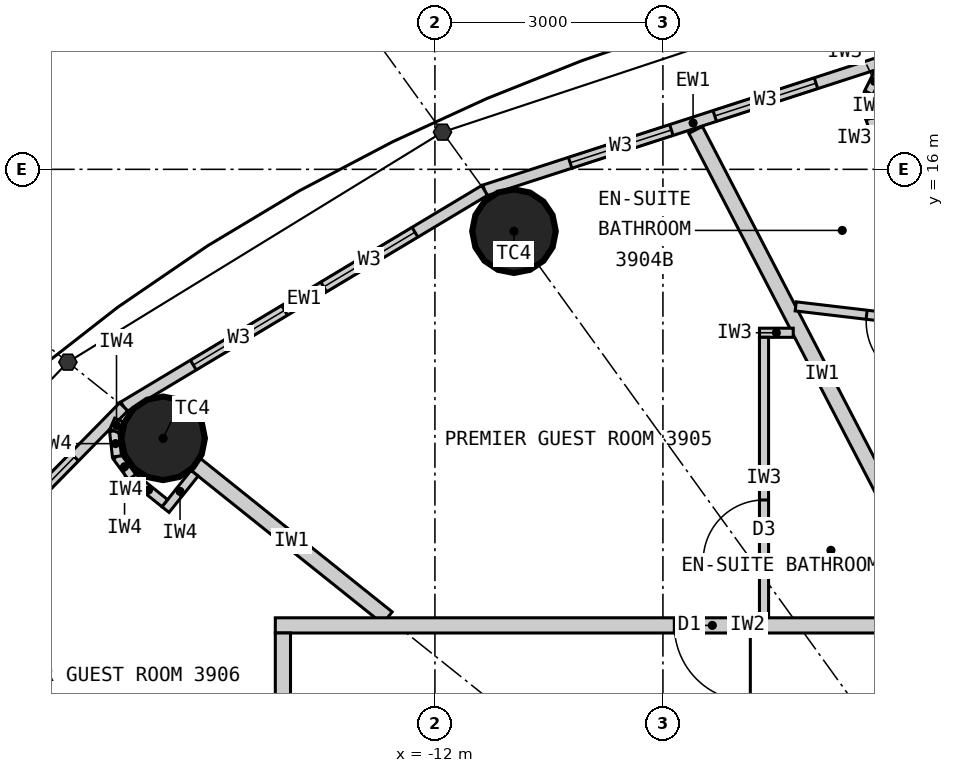
"""IFC4 building model, lengths in metres.
Left out: names, types, materials, properties, quantities, classifications, styles, units other than length and angle.
Written with IfcOpenShell. Run it as: python <this file> out.ifc"""

import sys

from ifc_helpers import new_model, si_unit, direction, frame, frame_2d, origin, origin_2d, place, context, subcontext, project, spatial, rectangle, circle, extrude, element, fill, save


model = new_model("IFC4")
c1 = context("Model", 3, precision=1e-05, world=origin(), true_north=direction((0.0, 1.0)))
c2 = subcontext(c1, "Body", "Model", "MODEL_VIEW")
j1 = project(units=[si_unit("LENGTHUNIT", "METRE"), si_unit("PLANEANGLEUNIT", "RADIAN")], contexts=[c1])
p1 = place(None, origin())
s1 = spatial("IfcSite", under=j1, at=p1, CompositionType="ELEMENT")
p2 = place(p1, origin())
s2 = spatial("IfcBuilding", under=s1, at=p2, CompositionType="ELEMENT")
p3 = place(p2, frame((0.0, 0.0, 150.0)))
s3 = spatial("IfcBuildingStorey", under=s2, at=p3, CompositionType="ELEMENT", Elevation=150.0)
for number, where, z_axis, x_axis in (
    (1, (-10.96, 15.186, 0.0), (0.0, 0.0, 1.0), (1.0, 0.0, 0.0)),
    (2, (-15.576, 12.461, 0.0), (0.0, 0.0, 1.0), (1.0, 0.0, 0.0)),
):
    element("IfcColumn", number, at=place(p3, frame(where, z_axis=z_axis, x_axis=x_axis)), inside=s3, PredefinedType="COLUMN", context=c2, shape_type="SweptSolid", body=[
        extrude(circle(Radius=0.55, at=origin_2d()), origin(), (0.0, 0.0, 1.0), 3.3),
    ])
p4 = place(p3, frame((-5.86, 17.497, 0.0), z_axis=(0.0, 0.0, 1.0), x_axis=(-0.951432482129, -0.307857486429, 0.0)))
e3 = element("IfcWall", 3, at=p4, inside=s3, PredefinedType="ELEMENTEDWALL", context=c2, shape_type="SweptSolid", body=[
    extrude(rectangle(XDim=5.766, YDim=0.15, at=frame_2d((2.883, 0.0))), origin(), (0.0, 0.0, 1.0), 3.12),
])
p5 = place(p4, frame((1.183, 0.0, 0.9)))
e4 = element("IfcOpeningElement", 4, at=p5, cuts=e3, PredefinedType="OPENING", context=c2, shape_type="SweptSolid", body=[
    extrude(rectangle(XDim=1.4, YDim=1.9, at=frame_2d((0.7, 0.95))), frame((0.0, 0.085, 0.0), z_axis=(0.0, -1.0, 0.0), x_axis=(1.0, 0.0, 0.0)), (0.0, 0.0, 1.0), 0.17),
])
p6 = place(p4, frame((3.183, 0.0, 0.9)))
e5 = element("IfcOpeningElement", 5, at=p6, cuts=e3, PredefinedType="OPENING", context=c2, shape_type="SweptSolid", body=[
    extrude(rectangle(XDim=1.4, YDim=1.9, at=frame_2d((0.7, 0.95))), frame((0.0, 0.085, 0.0), z_axis=(0.0, -1.0, 0.0), x_axis=(1.0, 0.0, 0.0)), (0.0, 0.0, 1.0), 0.17),
])
p7 = place(p3, frame((-11.346, 15.722, 0.0), z_axis=(0.0, 0.0, 1.0), x_axis=(-0.857695199231, -0.514158482587, 0.0)))
e6 = element("IfcWall", 6, at=p7, inside=s3, PredefinedType="ELEMENTEDWALL", context=c2, shape_type="SweptSolid", body=[
    extrude(rectangle(XDim=5.536, YDim=0.15, at=frame_2d((2.768, 0.0))), origin(), (0.0, 0.0, 1.0), 3.12),
])
p8 = place(p7, frame((1.068, 0.0, 0.9)))
e7 = element("IfcOpeningElement", 7, at=p8, cuts=e6, PredefinedType="OPENING", context=c2, shape_type="SweptSolid", body=[
    extrude(rectangle(XDim=1.4, YDim=1.9, at=frame_2d((0.7, 0.95))), frame((0.0, 0.085, 0.0), z_axis=(0.0, -1.0, 0.0), x_axis=(1.0, 0.0, 0.0)), (0.0, 0.0, 1.0), 0.17),
])
p9 = place(p7, frame((3.068, 0.0, 0.9)))
e8 = element("IfcOpeningElement", 8, at=p9, cuts=e6, PredefinedType="OPENING", context=c2, shape_type="SweptSolid", body=[
    extrude(rectangle(XDim=1.4, YDim=1.9, at=frame_2d((0.7, 0.95))), frame((0.0, 0.085, 0.0), z_axis=(0.0, -1.0, 0.0), x_axis=(1.0, 0.0, 0.0)), (0.0, 0.0, 1.0), 0.17),
])
p10 = place(p3, frame((-16.095, 12.876, 0.0), z_axis=(0.0, 0.0, 1.0), x_axis=(-0.700727467776, -0.71342905457, 0.0)))
e9 = element("IfcWall", 9, at=p10, inside=s3, PredefinedType="ELEMENTEDWALL", context=c2, shape_type="SweptSolid", body=[
    extrude(rectangle(XDim=5.247, YDim=0.15, at=frame_2d((2.624, 0.0))), origin(), (0.0, 0.0, 1.0), 3.12),
])
p11 = place(p10, frame((0.924, 0.0, 0.9)))
e10 = element("IfcOpeningElement", 10, at=p11, cuts=e9, PredefinedType="OPENING", context=c2, shape_type="SweptSolid", body=[
    extrude(rectangle(XDim=1.4, YDim=1.9, at=frame_2d((0.7, 0.95))), frame((0.0, 0.085, 0.0), z_axis=(0.0, -1.0, 0.0), x_axis=(1.0, 0.0, 0.0)), (0.0, 0.0, 1.0), 0.17),
])
p12 = place(p10, frame((2.924, 0.0, 0.9)))
e11 = element("IfcOpeningElement", 11, at=p12, cuts=e9, PredefinedType="OPENING", context=c2, shape_type="SweptSolid", body=[
    extrude(rectangle(XDim=1.4, YDim=1.9, at=frame_2d((0.7, 0.95))), frame((0.0, 0.085, 0.0), z_axis=(0.0, -1.0, 0.0), x_axis=(1.0, 0.0, 0.0)), (0.0, 0.0, 1.0), 0.17),
])
p13 = place(p3, frame((-5.24, 10.1, 0.0), z_axis=(0.0, 0.0, 1.0), x_axis=(-0.460532965373, 0.887642601391, 0.0)))
e12 = element("IfcWall", 12, at=p13, inside=s3, PredefinedType="PARTITIONING", context=c2, shape_type="SweptSolid", body=[
    extrude(rectangle(XDim=7.231, YDim=0.2, at=frame_2d((3.616, 0.0))), origin(), (0.0, 0.0, 1.0), 3.12),
])
p14 = place(p3, frame((-12.625, 10.1, 0.0), z_axis=(0.0, 0.0, 1.0), x_axis=(-0.780876185034, 0.624685827954, 0.0)))
e13 = element("IfcWall", 13, at=p14, inside=s3, PredefinedType="PARTITIONING", context=c2, shape_type="SweptSolid", body=[
    extrude(rectangle(XDim=3.229, YDim=0.2, at=frame_2d((1.615, 0.0))), origin(), (0.0, 0.0, 1.0), 2.42),
])
p15 = place(p3, frame((-7.253, 14.197, 0.0), z_axis=(0.0, 0.0, 1.0), x_axis=(0.993128188393, -0.117031625725, 0.0)))
e14 = element("IfcWall", 14, at=p15, inside=s3, PredefinedType="PARTITIONING", context=c2, shape_type="SweptSolid", body=[
    extrude(rectangle(XDim=2.678, YDim=0.12, at=frame_2d((1.339, 0.0))), origin(), (0.0, 0.0, 1.0), 3.12),
])
p16 = place(p15, frame((0.939, 0.0, 0.0)))
e15 = element("IfcOpeningElement", 15, at=p16, cuts=e14, PredefinedType="OPENING", context=c2, shape_type="SweptSolid", body=[
    extrude(rectangle(XDim=0.8, YDim=2.1, at=frame_2d((0.4, 1.05))), frame((0.0, 0.07, 0.0), z_axis=(0.0, -1.0, 0.0), x_axis=(1.0, 0.0, 0.0)), (0.0, 0.0, 1.0), 0.14),
])
p17 = place(p3, frame((-6.097, 16.149, 0.0), z_axis=(0.0, 0.0, 1.0), x_axis=(-0.317292604854, 0.948327687514, 0.0)))
e16 = element("IfcWall", 16, at=p17, inside=s3, PredefinedType="PARTITIONING", context=c2, shape_type="SweptSolid", body=[
    extrude(rectangle(XDim=0.55, YDim=0.12, at=frame_2d((0.275, 0.0))), origin(), (0.0, 0.0, 1.0), 3.12),
])
for number, where, z_axis, x_axis in (
    (17, (-6.271, 16.67, 0.0), (0.0, 0.0, 1.0), (-0.061, 0.998, 0.0)),
    (18, (-6.292, 17.007, 0.0), (0.0, 0.0, 1.0), (0.445, 0.895, 0.0)),
):
    element("IfcWall", number, at=place(p3, frame(where, z_axis=z_axis, x_axis=x_axis)), inside=s3, PredefinedType="PARTITIONING", context=c2, shape_type="SweptSolid", body=[
        extrude(rectangle(XDim=0.338, YDim=0.12, at=frame_2d((0.169, 0.0))), origin(), (0.0, 0.0, 1.0), 3.12),
    ])
p18 = place(p3, frame((-7.286, 13.85, 0.0), z_axis=(0.0, 0.0, 1.0), x_axis=(-1.0, 0.0, 0.0)))
e19 = element("IfcWall", 19, at=p18, inside=s3, PredefinedType="PARTITIONING", context=c2, shape_type="SweptSolid", body=[
    extrude(rectangle(XDim=0.444, YDim=0.12, at=frame_2d((0.222, 0.0))), origin(), (0.0, 0.0, 1.0), 3.12),
])
p19 = place(p3, frame((-7.67, 10.1, 0.0), z_axis=(0.0, 0.0, 1.0), x_axis=(0.0, 1.0, 0.0)))
e20 = element("IfcWall", 20, at=p19, inside=s3, PredefinedType="PARTITIONING", context=c2, shape_type="SweptSolid", body=[
    extrude(rectangle(XDim=3.69, YDim=0.12, at=frame_2d((1.845, 0.0))), origin(), (0.0, 0.0, 1.0), 3.12),
])
p20 = place(p19, frame((0.75, 0.0, 0.0)))
e21 = element("IfcOpeningElement", 21, at=p20, cuts=e20, PredefinedType="OPENING", context=c2, shape_type="SweptSolid", body=[
    extrude(rectangle(XDim=0.8, YDim=2.1, at=frame_2d((0.4, 1.05))), frame((0.0, 0.07, 0.0), z_axis=(0.0, -1.0, 0.0), x_axis=(1.0, 0.0, 0.0)), (0.0, 0.0, 1.0), 0.14),
])
p21 = place(p3, frame((-14.1, 10.0, 0.0), z_axis=(0.0, 0.0, 1.0), x_axis=(1.0, 0.0, 0.0)))
e22 = element("IfcWall", 22, at=p21, inside=s3, PredefinedType="PARTITIONING", context=c2, shape_type="SweptSolid", body=[
    extrude(rectangle(XDim=12.43, YDim=0.2, at=frame_2d((6.215, 0.0))), origin(), (0.0, 0.0, 1.0), 3.12),
])
p22 = place(p21, frame((5.25, 0.0, 0.0)))
e23 = element("IfcOpeningElement", 23, at=p22, cuts=e22, PredefinedType="OPENING", context=c2, shape_type="SweptSolid", body=[
    extrude(rectangle(XDim=1.0, YDim=2.2, at=frame_2d((0.5, 1.1))), frame((0.0, 0.11, 0.0), z_axis=(0.0, -1.0, 0.0), x_axis=(1.0, 0.0, 0.0)), (0.0, 0.0, 1.0), 0.22),
])
p23 = place(p3, frame((-14.0, 9.9, 0.0), z_axis=(0.0, 0.0, 1.0), x_axis=(0.0, -1.0, 0.0)))
e24 = element("IfcWall", 24, at=p23, inside=s3, PredefinedType="PARTITIONING", context=c2, shape_type="SweptSolid", body=[
    extrude(rectangle(XDim=8.23, YDim=0.2, at=frame_2d((4.115, 0.0))), origin(), (0.0, 0.0, 1.0), 3.12),
])
p24 = place(p23, frame((1.678, 0.0, 0.0)))
e25 = element("IfcOpeningElement", 25, at=p24, cuts=e24, PredefinedType="OPENING", context=c2, shape_type="SweptSolid", body=[
    extrude(rectangle(XDim=1.0, YDim=2.2, at=frame_2d((0.5, 1.1))), frame((0.0, 0.11, 0.0), z_axis=(0.0, -1.0, 0.0), x_axis=(1.0, 0.0, 0.0)), (0.0, 0.0, 1.0), 0.22),
])
p25 = place(p3, frame((-15.162, 12.002, 0.0), z_axis=(0.0, 0.0, 1.0), x_axis=(-0.624597762427, -0.780946627607, 0.0)))
e26 = element("IfcWall", 26, at=p25, inside=s3, PredefinedType="PARTITIONING", context=c2, shape_type="SweptSolid", body=[
    extrude(rectangle(XDim=0.612, YDim=0.12, at=frame_2d((0.306, 0.0))), origin(), (0.0, 0.0, 1.0), 3.12),
])
p26 = place(p3, frame((-15.554, 11.608, 0.0), z_axis=(0.0, 0.0, 1.0), x_axis=(-0.780695577787, 0.624911525597, 0.0)))
e27 = element("IfcWall", 27, at=p26, inside=s3, PredefinedType="PARTITIONING", context=c2, shape_type="SweptSolid", body=[
    extrude(rectangle(XDim=0.55, YDim=0.12, at=frame_2d((0.275, 0.0))), origin(), (0.0, 0.0, 1.0), 3.12),
])
p27 = place(p3, frame((-15.984, 11.952, 0.0), z_axis=(0.0, 0.0, 1.0), x_axis=(-0.592335221171, 0.805691619517, 0.0)))
e28 = element("IfcWall", 28, at=p27, inside=s3, PredefinedType="PARTITIONING", context=c2, shape_type="SweptSolid", body=[
    extrude(rectangle(XDim=0.338, YDim=0.12, at=frame_2d((0.169, 0.0))), origin(), (0.0, 0.0, 1.0), 3.12),
])
p28 = place(p3, frame((-16.184, 12.224, 0.0), z_axis=(0.0, 0.0, 1.0), x_axis=(-0.110669692975, 0.993857242795, 0.0)))
e29 = element("IfcWall", 29, at=p28, inside=s3, PredefinedType="PARTITIONING", context=c2, shape_type="SweptSolid", body=[
    extrude(rectangle(XDim=0.337, YDim=0.12, at=frame_2d((0.169, 0.0))), origin(), (0.0, 0.0, 1.0), 3.12),
])
p29 = place(p3, frame((-16.221, 12.559, 0.0), z_axis=(0.0, 0.0, 1.0), x_axis=(0.401064416249, 0.916049853457, 0.0)))
e30 = element("IfcWall", 30, at=p29, inside=s3, PredefinedType="PARTITIONING", context=c2, shape_type="SweptSolid", body=[
    extrude(rectangle(XDim=0.156, YDim=0.12, at=frame_2d((0.078, 0.0))), origin(), (0.0, 0.0, 1.0), 3.12),
])
p30 = place(p5, origin())
e31 = element("IfcWindow", 31, at=p30, inside=s3, PartitioningType="SINGLE_PANEL", PredefinedType="WINDOW", context=c2, shape_type="SweptSolid", body=[
    extrude(rectangle(XDim=1.4, YDim=1.9, at=frame_2d((0.7, 0.95))), frame((0.0, 0.03, 0.0), z_axis=(0.0, -1.0, 0.0), x_axis=(1.0, 0.0, 0.0)), (0.0, 0.0, 1.0), 0.06),
])
fill(e4, e31)
p31 = place(p6, origin())
e32 = element("IfcWindow", 32, at=p31, inside=s3, PartitioningType="SINGLE_PANEL", PredefinedType="WINDOW", context=c2, shape_type="SweptSolid", body=[
    extrude(rectangle(XDim=1.4, YDim=1.9, at=frame_2d((0.7, 0.95))), frame((0.0, 0.03, 0.0), z_axis=(0.0, -1.0, 0.0), x_axis=(1.0, 0.0, 0.0)), (0.0, 0.0, 1.0), 0.06),
])
fill(e5, e32)
p32 = place(p8, origin())
e33 = element("IfcWindow", 33, at=p32, inside=s3, PartitioningType="SINGLE_PANEL", PredefinedType="WINDOW", context=c2, shape_type="SweptSolid", body=[
    extrude(rectangle(XDim=1.4, YDim=1.9, at=frame_2d((0.7, 0.95))), frame((0.0, 0.03, 0.0), z_axis=(0.0, -1.0, 0.0), x_axis=(1.0, 0.0, 0.0)), (0.0, 0.0, 1.0), 0.06),
])
fill(e7, e33)
p33 = place(p9, origin())
e34 = element("IfcWindow", 34, at=p33, inside=s3, PartitioningType="SINGLE_PANEL", PredefinedType="WINDOW", context=c2, shape_type="SweptSolid", body=[
    extrude(rectangle(XDim=1.4, YDim=1.9, at=frame_2d((0.7, 0.95))), frame((0.0, 0.03, 0.0), z_axis=(0.0, -1.0, 0.0), x_axis=(1.0, 0.0, 0.0)), (0.0, 0.0, 1.0), 0.06),
])
fill(e8, e34)
p34 = place(p11, origin())
e35 = element("IfcWindow", 35, at=p34, inside=s3, PartitioningType="SINGLE_PANEL", PredefinedType="WINDOW", context=c2, shape_type="SweptSolid", body=[
    extrude(rectangle(XDim=1.4, YDim=1.9, at=frame_2d((0.7, 0.95))), frame((0.0, 0.03, 0.0), z_axis=(0.0, -1.0, 0.0), x_axis=(1.0, 0.0, 0.0)), (0.0, 0.0, 1.0), 0.06),
])
fill(e10, e35)
p35 = place(p16, origin())
e36 = element("IfcDoor", 36, at=p35, inside=s3, OperationType="SINGLE_SWING_RIGHT", PredefinedType="DOOR", context=c2, shape_type="SweptSolid", body=[
    extrude(rectangle(XDim=0.8, YDim=2.1, at=frame_2d((0.4, 1.05))), frame((0.0, 0.025, 0.0), z_axis=(0.0, -1.0, 0.0), x_axis=(1.0, 0.0, 0.0)), (0.0, 0.0, 1.0), 0.05),
])
fill(e15, e36)
p36 = place(p20, origin())
e37 = element("IfcDoor", 37, at=p36, inside=s3, OperationType="SINGLE_SWING_LEFT", PredefinedType="DOOR", context=c2, shape_type="SweptSolid", body=[
    extrude(rectangle(XDim=0.8, YDim=2.1, at=frame_2d((0.4, 1.05))), frame((0.0, 0.025, 0.0), z_axis=(0.0, -1.0, 0.0), x_axis=(1.0, 0.0, 0.0)), (0.0, 0.0, 1.0), 0.05),
])
fill(e21, e37)
p37 = place(p22, origin())
e38 = element("IfcDoor", 38, at=p37, inside=s3, OperationType="SINGLE_SWING_RIGHT", PredefinedType="DOOR", context=c2, shape_type="SweptSolid", body=[
    extrude(rectangle(XDim=1.0, YDim=2.2, at=frame_2d((0.5, 1.1))), frame((0.0, 0.025, 0.0), z_axis=(0.0, -1.0, 0.0), x_axis=(1.0, 0.0, 0.0)), (0.0, 0.0, 1.0), 0.05),
])
fill(e23, e38)
save(model, sys.argv[1])
